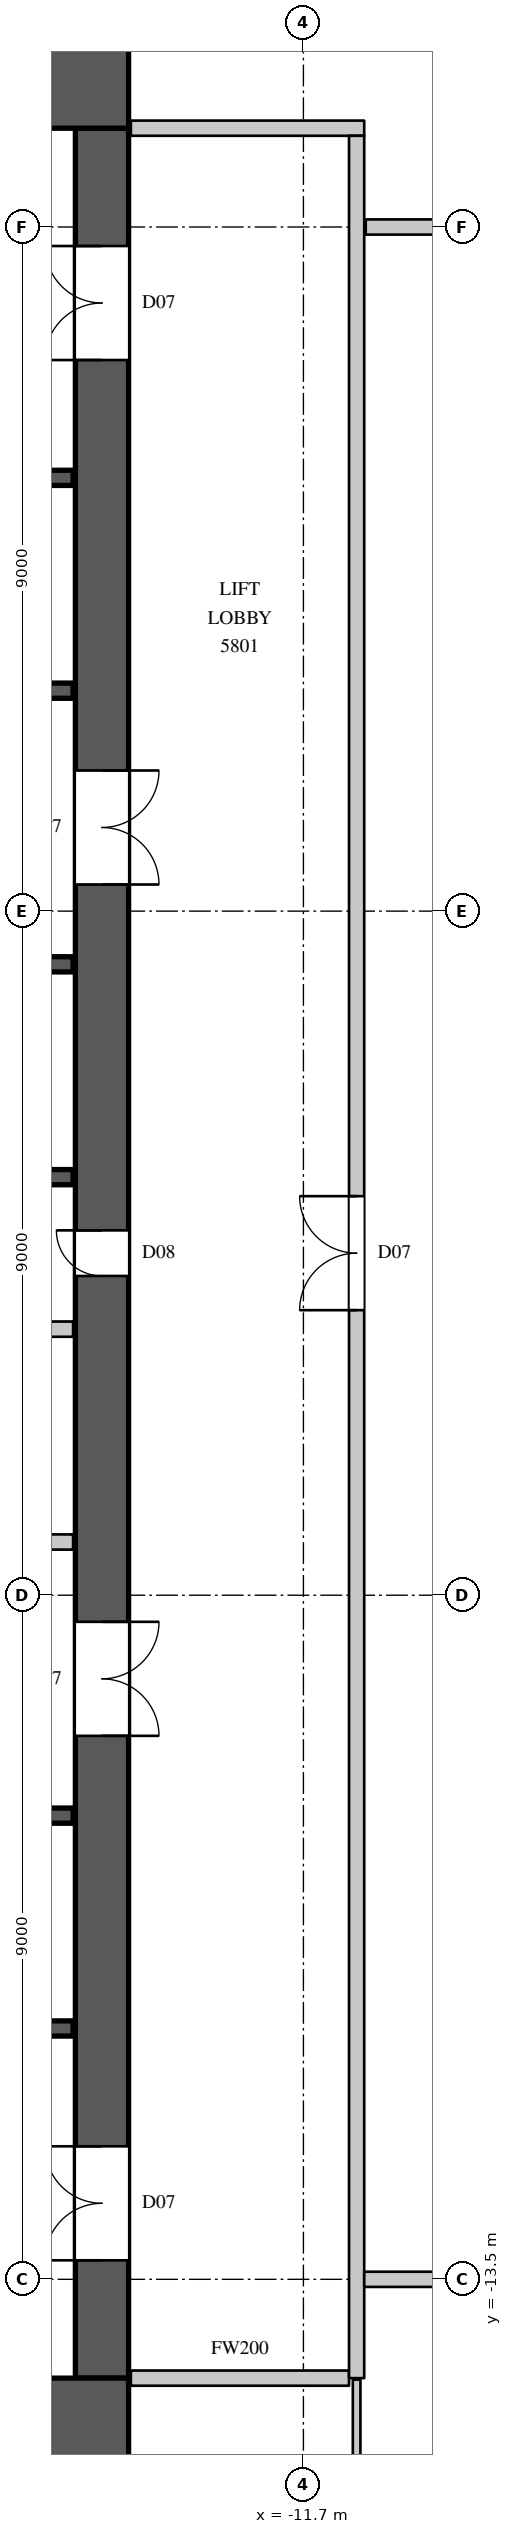
"""IFC4 building model, lengths in metres.
Left out: names, types, materials, properties, quantities, classifications, styles, units other than length and angle.
Written with IfcOpenShell. Run it as: python <this file> out.ifc"""

import sys

from ifc_helpers import new_model, si_unit, direction, frame, frame_2d, origin, place, context, subcontext, project, spatial, rectangle, extrude, element, fill, save


model = new_model("IFC4")
c1 = context("Model", 3, precision=1e-05, world=origin(), true_north=direction((0.0, 1.0)))
c2 = subcontext(c1, "Body", "Model", "MODEL_VIEW")
j1 = project(units=[si_unit("LENGTHUNIT", "METRE"), si_unit("PLANEANGLEUNIT", "RADIAN")], contexts=[c1])
p1 = place(None, origin())
s1 = spatial("IfcSite", under=j1, at=p1, CompositionType="ELEMENT")
p2 = place(p1, origin())
s2 = spatial("IfcBuilding", under=s1, at=p2, CompositionType="ELEMENT")
p3 = place(p2, frame((0.0, 0.0, 259.8)))
s3 = spatial("IfcBuildingStorey", under=s2, at=p3, CompositionType="ELEMENT", Elevation=259.8)
for number, where, z_axis, x_axis in (
    (1, (-30.0, 15.4, 0.0), (0.0, 0.0, 1.0), (1.0, 0.0, 0.0)),
    (2, (-30.0, -15.4, 0.0), (0.0, 0.0, 1.0), (1.0, 0.0, 0.0)),
):
    element("IfcWall", number, at=place(p3, frame(where, z_axis=z_axis, x_axis=x_axis)), inside=s3, PredefinedType="SHEAR", context=c2, shape_type="SweptSolid", body=[
        extrude(rectangle(XDim=16.0, YDim=1.2, at=frame_2d((8.0, 0.0))), origin(), (0.0, 0.0, 1.0), 4.1),
    ])
p4 = place(p3, frame((-14.35, -14.8, 0.0), z_axis=(0.0, 0.0, 1.0), x_axis=(0.0, 1.0, 0.0)))
e3 = element("IfcWall", 3, at=p4, inside=s3, PredefinedType="SHEAR", context=c2, shape_type="SweptSolid", body=[
    extrude(rectangle(XDim=29.6, YDim=0.7, at=frame_2d((14.8, 0.0))), origin(), (0.0, 0.0, 1.0), 4.1),
])
p5 = place(p4, frame((1.55, 0.0, 0.0)))
e4 = element("IfcOpeningElement", 4, at=p5, cuts=e3, PredefinedType="OPENING", context=c2, shape_type="SweptSolid", body=[
    extrude(rectangle(XDim=1.5, YDim=2.4, at=frame_2d((0.75, 1.2))), frame((0.0, 0.36, 0.0), z_axis=(0.0, -1.0, 0.0), x_axis=(1.0, 0.0, 0.0)), (0.0, 0.0, 1.0), 0.72),
])
p6 = place(p4, frame((26.55, 0.0, 0.0)))
e5 = element("IfcOpeningElement", 5, at=p6, cuts=e3, PredefinedType="OPENING", context=c2, shape_type="SweptSolid", body=[
    extrude(rectangle(XDim=1.5, YDim=2.4, at=frame_2d((0.75, 1.2))), frame((0.0, 0.36, 0.0), z_axis=(0.0, -1.0, 0.0), x_axis=(1.0, 0.0, 0.0)), (0.0, 0.0, 1.0), 0.72),
])
p7 = place(p4, frame((8.45, 0.0, 0.0)))
e6 = element("IfcOpeningElement", 6, at=p7, cuts=e3, PredefinedType="OPENING", context=c2, shape_type="SweptSolid", body=[
    extrude(rectangle(XDim=1.5, YDim=2.4, at=frame_2d((0.75, 1.2))), frame((0.0, 0.36, 0.0), z_axis=(0.0, -1.0, 0.0), x_axis=(1.0, 0.0, 0.0)), (0.0, 0.0, 1.0), 0.72),
])
p8 = place(p4, frame((19.65, 0.0, 0.0)))
e7 = element("IfcOpeningElement", 7, at=p8, cuts=e3, PredefinedType="OPENING", context=c2, shape_type="SweptSolid", body=[
    extrude(rectangle(XDim=1.5, YDim=2.4, at=frame_2d((0.75, 1.2))), frame((0.0, 0.36, 0.0), z_axis=(0.0, -1.0, 0.0), x_axis=(1.0, 0.0, 0.0)), (0.0, 0.0, 1.0), 0.72),
])
p9 = place(p4, frame((14.5, 0.0, 0.0)))
e8 = element("IfcOpeningElement", 8, at=p9, cuts=e3, PredefinedType="OPENING", context=c2, shape_type="SweptSolid", body=[
    extrude(rectangle(XDim=0.6, YDim=2.0, at=frame_2d((0.3, 1.0))), frame((0.0, 0.36, 0.0), z_axis=(0.0, -1.0, 0.0), x_axis=(1.0, 0.0, 0.0)), (0.0, 0.0, 1.0), 0.72),
])
p10 = place(p3, frame((-29.27, -3.8, 0.0), z_axis=(0.0, 0.0, 1.0), x_axis=(1.0, 0.0, 0.0)))
e9 = element("IfcWall", 9, at=p10, inside=s3, PredefinedType="PARTITIONING", context=c2, shape_type="SweptSolid", body=[
    extrude(rectangle(XDim=14.54, YDim=0.2, at=frame_2d((7.27, 0.0))), origin(), (0.0, 0.0, 1.0), 3.8),
])
p11 = place(p10, frame((6.8, 0.0, 0.0)))
e10 = element("IfcOpeningElement", 10, at=p11, cuts=e9, PredefinedType="OPENING", context=c2, shape_type="SweptSolid", body=[
    extrude(rectangle(XDim=0.9, YDim=2.2, at=frame_2d((0.45, 1.1))), frame((0.0, 0.11, 0.0), z_axis=(0.0, -1.0, 0.0), x_axis=(1.0, 0.0, 0.0)), (0.0, 0.0, 1.0), 0.22),
])
p12 = place(p3, frame((-13.97, -14.8, 0.0), z_axis=(0.0, 0.0, 1.0), x_axis=(1.0, 0.0, 0.0)))
e11 = element("IfcWall", 11, at=p12, inside=s3, PredefinedType="PARTITIONING", context=c2, shape_type="SweptSolid", body=[
    extrude(rectangle(XDim=2.87, YDim=0.2, at=frame_2d((1.435, 0.0))), origin(), (0.0, 0.0, 1.0), 3.8),
])
p13 = place(p3, frame((-13.97, 14.8, 0.0), z_axis=(0.0, 0.0, 1.0), x_axis=(1.0, 0.0, 0.0)))
e12 = element("IfcWall", 12, at=p13, inside=s3, PredefinedType="PARTITIONING", context=c2, shape_type="SweptSolid", body=[
    extrude(rectangle(XDim=3.07, YDim=0.2, at=frame_2d((1.535, 0.0))), origin(), (0.0, 0.0, 1.0), 3.8),
])
p14 = place(p3, frame((-11.0, -14.8, 0.0), z_axis=(0.0, 0.0, 1.0), x_axis=(0.0, 1.0, 0.0)))
e13 = element("IfcWall", 13, at=p14, inside=s3, PredefinedType="PARTITIONING", context=c2, shape_type="SweptSolid", body=[
    extrude(rectangle(XDim=29.5, YDim=0.2, at=frame_2d((14.75, 0.0))), origin(), (0.0, 0.0, 1.0), 3.8),
])
p15 = place(p14, frame((14.05, 0.0, 0.0)))
e14 = element("IfcOpeningElement", 14, at=p15, cuts=e13, PredefinedType="OPENING", context=c2, shape_type="SweptSolid", body=[
    extrude(rectangle(XDim=1.5, YDim=2.4, at=frame_2d((0.75, 1.2))), frame((0.0, 0.11, 0.0), z_axis=(0.0, -1.0, 0.0), x_axis=(1.0, 0.0, 0.0)), (0.0, 0.0, 1.0), 0.22),
])
p16 = place(p3, frame((-10.9, -13.5, 0.0), z_axis=(0.0, 0.0, 1.0), x_axis=(1.0, 0.0, 0.0)))
e15 = element("IfcWall", 15, at=p16, inside=s3, PredefinedType="PARTITIONING", context=c2, shape_type="SweptSolid", body=[
    extrude(rectangle(XDim=23.3, YDim=0.2, at=frame_2d((11.65, 0.0))), origin(), (0.0, 0.0, 1.0), 3.8),
])
p17 = place(p16, frame((1.1, 0.0, 0.0)))
e16 = element("IfcOpeningElement", 16, at=p17, cuts=e15, PredefinedType="OPENING", context=c2, shape_type="SweptSolid", body=[
    extrude(rectangle(XDim=0.9, YDim=2.2, at=frame_2d((0.45, 1.1))), frame((0.0, 0.11, 0.0), z_axis=(0.0, -1.0, 0.0), x_axis=(1.0, 0.0, 0.0)), (0.0, 0.0, 1.0), 0.22),
])
p18 = place(p16, frame((4.4, 0.0, 0.0)))
e17 = element("IfcOpeningElement", 17, at=p18, cuts=e15, PredefinedType="OPENING", context=c2, shape_type="SweptSolid", body=[
    extrude(rectangle(XDim=0.9, YDim=2.2, at=frame_2d((0.45, 1.1))), frame((0.0, 0.11, 0.0), z_axis=(0.0, -1.0, 0.0), x_axis=(1.0, 0.0, 0.0)), (0.0, 0.0, 1.0), 0.22),
])
p19 = place(p16, frame((7.25, 0.0, 0.0)))
e18 = element("IfcOpeningElement", 18, at=p19, cuts=e15, PredefinedType="OPENING", context=c2, shape_type="SweptSolid", body=[
    extrude(rectangle(XDim=0.9, YDim=2.2, at=frame_2d((0.45, 1.1))), frame((0.0, 0.11, 0.0), z_axis=(0.0, -1.0, 0.0), x_axis=(1.0, 0.0, 0.0)), (0.0, 0.0, 1.0), 0.22),
])
p20 = place(p16, frame((10.6, 0.0, 0.0)))
e19 = element("IfcOpeningElement", 19, at=p20, cuts=e15, PredefinedType="OPENING", context=c2, shape_type="SweptSolid", body=[
    extrude(rectangle(XDim=1.1, YDim=2.4, at=frame_2d((0.55, 1.2))), frame((0.0, 0.11, 0.0), z_axis=(0.0, -1.0, 0.0), x_axis=(1.0, 0.0, 0.0)), (0.0, 0.0, 1.0), 0.22),
])
p21 = place(p3, frame((-10.88, 13.5, 0.0), z_axis=(0.0, 0.0, 1.0), x_axis=(1.0, 0.0, 0.0)))
e20 = element("IfcWall", 20, at=p21, inside=s3, PredefinedType="PARTITIONING", context=c2, shape_type="SweptSolid", body=[
    extrude(rectangle(XDim=4.58, YDim=0.2, at=frame_2d((2.29, 0.0))), origin(), (0.0, 0.0, 1.0), 3.8),
])
p22 = place(p3, frame((-29.27, -1.0, 0.0), z_axis=(0.0, 0.0, 1.0), x_axis=(1.0, 0.0, 0.0)))
e21 = element("IfcWall", 21, at=p22, inside=s3, PredefinedType="PARTITIONING", context=c2, shape_type="SweptSolid", body=[
    extrude(rectangle(XDim=14.54, YDim=0.2, at=frame_2d((7.27, 0.0))), origin(), (0.0, 0.0, 1.0), 3.8),
])
p23 = place(p3, frame((-17.92, -10.2, 0.0), z_axis=(0.0, 0.0, 1.0), x_axis=(1.0, 0.0, 0.0)))
e22 = element("IfcWall", 22, at=p23, inside=s3, PredefinedType="SHEAR", context=c2, shape_type="SweptSolid", body=[
    extrude(rectangle(XDim=3.19, YDim=0.2, at=frame_2d((1.595, 0.0))), origin(), (0.0, 0.0, 1.0), 3.8),
])
p24 = place(p23, frame((1.05, 0.0, 0.0)))
e23 = element("IfcOpeningElement", 23, at=p24, cuts=e22, PredefinedType="OPENING", context=c2, shape_type="SweptSolid", body=[
    extrude(rectangle(XDim=1.1, YDim=2.2, at=frame_2d((0.55, 1.1))), frame((0.0, 0.11, 0.0), z_axis=(0.0, -1.0, 0.0), x_axis=(1.0, 0.0, 0.0)), (0.0, 0.0, 1.0), 0.22),
])
for number, where, z_axis, x_axis in (
    (24, (-17.9, -7.4, 0.0), (0.0, 0.0, 1.0), (1.0, 0.0, 0.0)),
    (25, (-17.9, 1.0, 0.0), (0.0, 0.0, 1.0), (1.0, 0.0, 0.0)),
):
    element("IfcWall", number, at=place(p3, frame(where, z_axis=z_axis, x_axis=x_axis)), inside=s3, PredefinedType="SHEAR", context=c2, shape_type="SweptSolid", body=[
        extrude(rectangle(XDim=3.17, YDim=0.2, at=frame_2d((1.585, 0.0))), origin(), (0.0, 0.0, 1.0), 3.8),
    ])
p25 = place(p3, frame((-17.9, 3.8, 0.0), z_axis=(0.0, 0.0, 1.0), x_axis=(1.0, 0.0, 0.0)))
e26 = element("IfcWall", 26, at=p25, inside=s3, PredefinedType="SHEAR", context=c2, shape_type="SweptSolid", body=[
    extrude(rectangle(XDim=3.17, YDim=0.2, at=frame_2d((1.585, 0.0))), origin(), (0.0, 0.0, 1.0), 3.8),
])
p26 = place(p25, frame((1.05, 0.0, 0.0)))
e27 = element("IfcOpeningElement", 27, at=p26, cuts=e26, PredefinedType="OPENING", context=c2, shape_type="SweptSolid", body=[
    extrude(rectangle(XDim=1.1, YDim=2.2, at=frame_2d((0.55, 1.1))), frame((0.0, 0.11, 0.0), z_axis=(0.0, -1.0, 0.0), x_axis=(1.0, 0.0, 0.0)), (0.0, 0.0, 1.0), 0.22),
])
p27 = place(p3, frame((-17.92, 7.4, 0.0), z_axis=(0.0, 0.0, 1.0), x_axis=(1.0, 0.0, 0.0)))
e28 = element("IfcWall", 28, at=p27, inside=s3, PredefinedType="SHEAR", context=c2, shape_type="SweptSolid", body=[
    extrude(rectangle(XDim=3.19, YDim=0.2, at=frame_2d((1.595, 0.0))), origin(), (0.0, 0.0, 1.0), 3.8),
])
p28 = place(p3, frame((-17.92, 10.2, 0.0), z_axis=(0.0, 0.0, 1.0), x_axis=(1.0, 0.0, 0.0)))
e29 = element("IfcWall", 29, at=p28, inside=s3, PredefinedType="SHEAR", context=c2, shape_type="SweptSolid", body=[
    extrude(rectangle(XDim=3.19, YDim=0.2, at=frame_2d((1.595, 0.0))), origin(), (0.0, 0.0, 1.0), 3.8),
])
p29 = place(p28, frame((1.05, 0.0, 0.0)))
e30 = element("IfcOpeningElement", 30, at=p29, cuts=e29, PredefinedType="OPENING", context=c2, shape_type="SweptSolid", body=[
    extrude(rectangle(XDim=1.1, YDim=2.2, at=frame_2d((0.55, 1.1))), frame((0.0, 0.11, 0.0), z_axis=(0.0, -1.0, 0.0), x_axis=(1.0, 0.0, 0.0)), (0.0, 0.0, 1.0), 0.22),
])
p30 = place(p3, frame((-11.0, -23.757, 0.0), z_axis=(0.0, 0.0, 1.0), x_axis=(0.0, 1.0, 0.0)))
e31 = element("IfcWall", 31, at=p30, inside=s3, PredefinedType="PARTITIONING", context=c2, shape_type="SweptSolid", body=[
    extrude(rectangle(XDim=8.937, YDim=0.1, at=frame_2d((4.468, 0.0))), origin(), (0.0, 0.0, 1.0), 3.8),
])
p31 = place(p15, origin())
e32 = element("IfcDoor", 32, at=p31, inside=s3, OperationType="DOUBLE_DOOR_SINGLE_SWING", PredefinedType="DOOR", context=c2, shape_type="SweptSolid", body=[
    extrude(rectangle(XDim=1.5, YDim=2.4, at=frame_2d((0.75, 1.2))), frame((0.0, 0.025, 0.0), z_axis=(0.0, -1.0, 0.0), x_axis=(1.0, 0.0, 0.0)), (0.0, 0.0, 1.0), 0.05),
])
fill(e14, e32)
p32 = place(p5, origin())
e33 = element("IfcDoor", 33, at=p32, inside=s3, OperationType="DOUBLE_DOOR_SINGLE_SWING", PredefinedType="DOOR", context=c2, shape_type="SweptSolid", body=[
    extrude(rectangle(XDim=1.5, YDim=2.4, at=frame_2d((0.75, 1.2))), frame((0.0, 0.345, 0.0), z_axis=(0.0, -1.0, 0.0), x_axis=(1.0, 0.0, 0.0)), (0.0, 0.0, 1.0), 0.05),
])
fill(e4, e33)
p33 = place(p6, origin())
e34 = element("IfcDoor", 34, at=p33, inside=s3, OperationType="DOUBLE_DOOR_SINGLE_SWING", PredefinedType="DOOR", context=c2, shape_type="SweptSolid", body=[
    extrude(rectangle(XDim=1.5, YDim=2.4, at=frame_2d((0.75, 1.2))), frame((0.0, 0.345, 0.0), z_axis=(0.0, -1.0, 0.0), x_axis=(1.0, 0.0, 0.0)), (0.0, 0.0, 1.0), 0.05),
])
fill(e5, e34)
p34 = place(p7, origin())
e35 = element("IfcDoor", 35, at=p34, inside=s3, OperationType="DOUBLE_DOOR_SINGLE_SWING", PredefinedType="DOOR", context=c2, shape_type="SweptSolid", body=[
    extrude(rectangle(XDim=1.5, YDim=2.4, at=frame_2d((0.75, 1.2))), frame((0.0, -0.295, 0.0), z_axis=(0.0, -1.0, 0.0), x_axis=(1.0, 0.0, 0.0)), (0.0, 0.0, 1.0), 0.05),
])
fill(e6, e35)
p35 = place(p8, origin())
e36 = element("IfcDoor", 36, at=p35, inside=s3, OperationType="DOUBLE_DOOR_SINGLE_SWING", PredefinedType="DOOR", context=c2, shape_type="SweptSolid", body=[
    extrude(rectangle(XDim=1.5, YDim=2.4, at=frame_2d((0.75, 1.2))), frame((0.0, -0.295, 0.0), z_axis=(0.0, -1.0, 0.0), x_axis=(1.0, 0.0, 0.0)), (0.0, 0.0, 1.0), 0.05),
])
fill(e7, e36)
p36 = place(p9, origin())
e37 = element("IfcDoor", 37, at=p36, inside=s3, OperationType="SINGLE_SWING_RIGHT", PredefinedType="DOOR", context=c2, shape_type="SweptSolid", body=[
    extrude(rectangle(XDim=0.6, YDim=2.0, at=frame_2d((0.3, 1.0))), frame((0.0, 0.345, 0.0), z_axis=(0.0, -1.0, 0.0), x_axis=(1.0, 0.0, 0.0)), (0.0, 0.0, 1.0), 0.05),
])
fill(e8, e37)
save(model, sys.argv[1])
